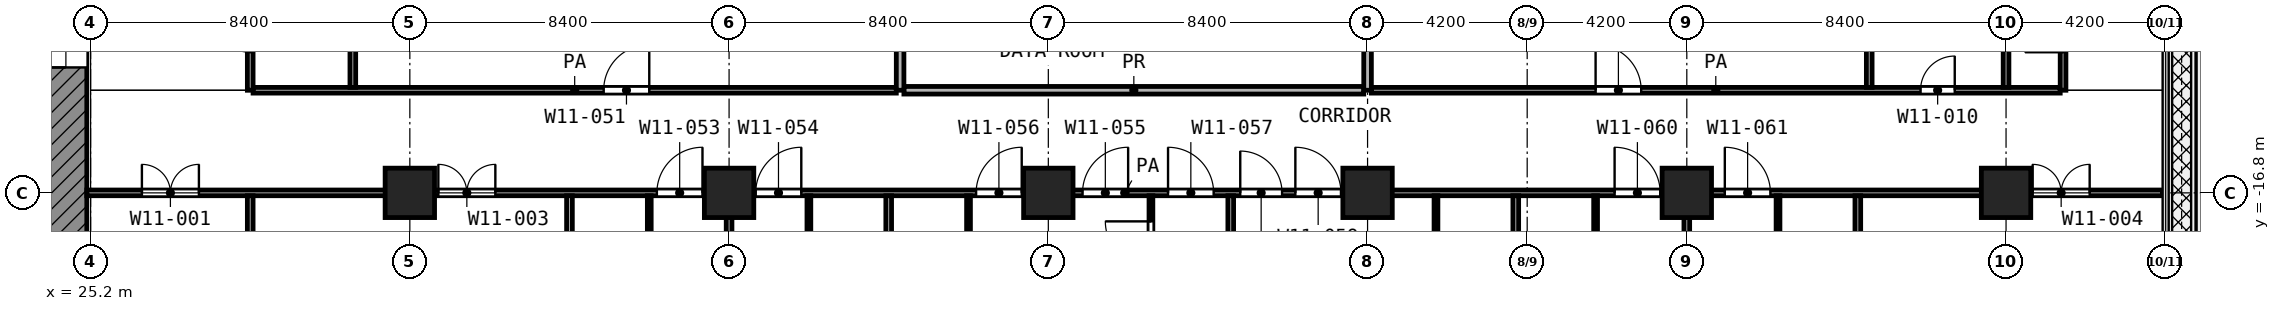
"""IFC4 building model, lengths in metres.
Left out: names, types, materials, properties, quantities, classifications, styles, units other than length and angle.
Written with IfcOpenShell. Run it as: python <this file> out.ifc"""

import sys

from ifc_helpers import new_model, si_unit, direction, frame, frame_2d, origin, origin_2d, place, context, subcontext, project, spatial, rectangle, extrude, element, fill, save


model = new_model("IFC4")
c1 = context("Model", 3, precision=1e-05, world=origin(), true_north=direction((0.0, 1.0)))
c2 = subcontext(c1, "Body", "Model", "MODEL_VIEW")
j1 = project(units=[si_unit("LENGTHUNIT", "METRE"), si_unit("PLANEANGLEUNIT", "RADIAN")], contexts=[c1])
p1 = place(None, origin())
s1 = spatial("IfcSite", under=j1, at=p1, CompositionType="ELEMENT")
p2 = place(p1, origin())
s2 = spatial("IfcBuilding", under=s1, at=p2, CompositionType="ELEMENT")
p3 = place(p2, frame((0.0, 0.0, 72.8)))
s3 = spatial("IfcBuildingStorey", under=s2, at=p3, CompositionType="ELEMENT", Elevation=72.8)
for number, where, z_axis, x_axis in (
    (1, (33.6, -16.8, 0.0), (0.0, 0.0, 1.0), (1.0, 0.0, 0.0)),
    (2, (42.0, -16.8, 0.0), (0.0, 0.0, 1.0), (1.0, 0.0, 0.0)),
    (3, (50.4, -16.8, 0.0), (0.0, 0.0, 1.0), (1.0, 0.0, 0.0)),
    (4, (58.8, -16.8, 0.0), (0.0, 0.0, 1.0), (1.0, 0.0, 0.0)),
    (5, (67.2, -16.8, 0.0), (0.0, 0.0, 1.0), (1.0, 0.0, 0.0)),
    (6, (75.6, -16.8, 0.0), (0.0, 0.0, 1.0), (1.0, 0.0, 0.0)),
):
    element("IfcColumn", number, at=place(p3, frame(where, z_axis=z_axis, x_axis=x_axis)), inside=s3, PredefinedType="COLUMN", context=c2, shape_type="SweptSolid", body=[
        extrude(rectangle(XDim=1.3, YDim=1.3, at=origin_2d()), origin(), (0.0, 0.0, 1.0), 4.2),
    ])
p4 = place(p3, frame((24.55, -24.0, 0.0), z_axis=(0.0, 0.0, 1.0), x_axis=(0.0, 1.0, 0.0)))
e7 = element("IfcWall", 7, at=p4, inside=s3, PredefinedType="SHEAR", context=c2, shape_type="SweptSolid", body=[
    extrude(rectangle(XDim=18.6, YDim=1.1, at=frame_2d((9.3, 0.0))), origin(), (0.0, 0.0, 1.0), 3.9),
])
p5 = place(p4, frame((10.5, 0.0, 0.0)))
e8 = element("IfcOpeningElement", 8, at=p5, cuts=e7, PredefinedType="OPENING", context=c2, shape_type="SweptSolid", body=[
    extrude(rectangle(XDim=1.8, YDim=2.1, at=frame_2d((0.9, 1.05))), frame((0.0, 0.56, 0.0), z_axis=(0.0, -1.0, 0.0), x_axis=(1.0, 0.0, 0.0)), (0.0, 0.0, 1.0), 1.12),
])
p6 = place(p3, frame((39.9, -20.1, 0.0), z_axis=(0.0, 0.0, 1.0), x_axis=(0.0, 1.0, 0.0)))
e9 = element("IfcWall", 9, at=p6, inside=s3, PredefinedType="PARTITIONING", context=c2, shape_type="SweptSolid", body=[
    extrude(rectangle(XDim=3.225, YDim=0.1, at=frame_2d((1.613, 0.0))), origin(), (0.0, 0.0, 1.0), 3.9),
])
for number, where, z_axis, x_axis in (
    (10, (44.1, -19.5, 0.0), (0.0, 0.0, 1.0), (0.0, 1.0, 0.0)),
    (11, (48.3, -19.5, 0.0), (0.0, 0.0, 1.0), (0.0, 1.0, 0.0)),
):
    element("IfcWall", number, at=place(p3, frame(where, z_axis=z_axis, x_axis=x_axis)), inside=s3, PredefinedType="PARTITIONING", context=c2, shape_type="SweptSolid", body=[
        extrude(rectangle(XDim=2.625, YDim=0.1, at=frame_2d((1.312, 0.0))), origin(), (0.0, 0.0, 1.0), 3.9),
    ])
p7 = place(p3, frame((53.1, -19.5, 0.0), z_axis=(0.0, 0.0, 1.0), x_axis=(0.0, 1.0, 0.0)))
e12 = element("IfcWall", 12, at=p7, inside=s3, PredefinedType="PARTITIONING", context=c2, shape_type="SweptSolid", body=[
    extrude(rectangle(XDim=2.625, YDim=0.1, at=frame_2d((1.312, 0.0))), origin(), (0.0, 0.0, 1.0), 3.9),
])
p8 = place(p7, frame((0.75, 0.0, 0.0)))
e13 = element("IfcOpeningElement", 13, at=p8, cuts=e12, PredefinedType="OPENING", context=c2, shape_type="SweptSolid", body=[
    extrude(rectangle(XDim=1.2, YDim=2.1, at=frame_2d((0.6, 1.05))), frame((0.0, 0.06, 0.0), z_axis=(0.0, -1.0, 0.0), x_axis=(1.0, 0.0, 0.0)), (0.0, 0.0, 1.0), 0.12),
])
p9 = place(p3, frame((60.6, -19.499, 0.0), z_axis=(0.0, 0.0, 1.0), x_axis=(0.0, 1.0, 0.0)))
e14 = element("IfcWall", 14, at=p9, inside=s3, PredefinedType="PARTITIONING", context=c2, shape_type="SweptSolid", body=[
    extrude(rectangle(XDim=2.624, YDim=0.1, at=frame_2d((1.312, 0.0))), origin(), (0.0, 0.0, 1.0), 3.9),
])
p10 = place(p3, frame((64.8, -20.1, 0.0), z_axis=(0.0, 0.0, 1.0), x_axis=(0.0, 1.0, 0.0)))
e15 = element("IfcWall", 15, at=p10, inside=s3, PredefinedType="PARTITIONING", context=c2, shape_type="SweptSolid", body=[
    extrude(rectangle(XDim=3.225, YDim=0.1, at=frame_2d((1.613, 0.0))), origin(), (0.0, 0.0, 1.0), 3.9),
])
p11 = place(p3, frame((69.6, -19.5, 0.0), z_axis=(0.0, 0.0, 1.0), x_axis=(0.0, 1.0, 0.0)))
e16 = element("IfcWall", 16, at=p11, inside=s3, PredefinedType="PARTITIONING", context=c2, shape_type="SweptSolid", body=[
    extrude(rectangle(XDim=2.625, YDim=0.1, at=frame_2d((1.312, 0.0))), origin(), (0.0, 0.0, 1.0), 3.9),
])
p12 = place(p3, frame((25.1, -16.8, 0.0), z_axis=(0.0, 0.0, 1.0), x_axis=(1.0, 0.0, 0.0)))
e17 = element("IfcWall", 17, at=p12, inside=s3, PredefinedType="PARTITIONING", context=c2, shape_type="SweptSolid", body=[
    extrude(rectangle(XDim=54.62, YDim=0.15, at=frame_2d((27.31, 0.0))), origin(), (0.0, 0.0, 1.0), 3.9),
])
p13 = place(p12, frame((1.45, 0.0, 0.0)))
e18 = element("IfcOpeningElement", 18, at=p13, cuts=e17, PredefinedType="OPENING", context=c2, shape_type="SweptSolid", body=[
    extrude(rectangle(XDim=1.5, YDim=2.1, at=frame_2d((0.75, 1.05))), frame((0.0, 0.085, 0.0), z_axis=(0.0, -1.0, 0.0), x_axis=(1.0, 0.0, 0.0)), (0.0, 0.0, 1.0), 0.17),
])
p14 = place(p12, frame((9.25, 0.0, 0.0)))
e19 = element("IfcOpeningElement", 19, at=p14, cuts=e17, PredefinedType="OPENING", context=c2, shape_type="SweptSolid", body=[
    extrude(rectangle(XDim=1.5, YDim=2.1, at=frame_2d((0.75, 1.05))), frame((0.0, 0.085, 0.0), z_axis=(0.0, -1.0, 0.0), x_axis=(1.0, 0.0, 0.0)), (0.0, 0.0, 1.0), 0.17),
])
p15 = place(p12, frame((15.0, 0.0, 0.0)))
e20 = element("IfcOpeningElement", 20, at=p15, cuts=e17, PredefinedType="OPENING", context=c2, shape_type="SweptSolid", body=[
    extrude(rectangle(XDim=1.2, YDim=2.1, at=frame_2d((0.6, 1.05))), frame((0.0, 0.085, 0.0), z_axis=(0.0, -1.0, 0.0), x_axis=(1.0, 0.0, 0.0)), (0.0, 0.0, 1.0), 0.17),
])
p16 = place(p12, frame((17.6, 0.0, 0.0)))
e21 = element("IfcOpeningElement", 21, at=p16, cuts=e17, PredefinedType="OPENING", context=c2, shape_type="SweptSolid", body=[
    extrude(rectangle(XDim=1.2, YDim=2.1, at=frame_2d((0.6, 1.05))), frame((0.0, 0.085, 0.0), z_axis=(0.0, -1.0, 0.0), x_axis=(1.0, 0.0, 0.0)), (0.0, 0.0, 1.0), 0.17),
])
p17 = place(p12, frame((26.2, 0.0, 0.0)))
e22 = element("IfcOpeningElement", 22, at=p17, cuts=e17, PredefinedType="OPENING", context=c2, shape_type="SweptSolid", body=[
    extrude(rectangle(XDim=1.2, YDim=2.1, at=frame_2d((0.6, 1.05))), frame((0.0, 0.085, 0.0), z_axis=(0.0, -1.0, 0.0), x_axis=(1.0, 0.0, 0.0)), (0.0, 0.0, 1.0), 0.17),
])
p18 = place(p12, frame((23.4, 0.0, 0.0)))
e23 = element("IfcOpeningElement", 23, at=p18, cuts=e17, PredefinedType="OPENING", context=c2, shape_type="SweptSolid", body=[
    extrude(rectangle(XDim=1.2, YDim=2.1, at=frame_2d((0.6, 1.05))), frame((0.0, 0.085, 0.0), z_axis=(0.0, -1.0, 0.0), x_axis=(1.0, 0.0, 0.0)), (0.0, 0.0, 1.0), 0.17),
])
p19 = place(p12, frame((28.45, 0.0, 0.0)))
e24 = element("IfcOpeningElement", 24, at=p19, cuts=e17, PredefinedType="OPENING", context=c2, shape_type="SweptSolid", body=[
    extrude(rectangle(XDim=1.2, YDim=2.1, at=frame_2d((0.6, 1.05))), frame((0.0, 0.085, 0.0), z_axis=(0.0, -1.0, 0.0), x_axis=(1.0, 0.0, 0.0)), (0.0, 0.0, 1.0), 0.17),
])
p20 = place(p12, frame((31.8, 0.0, 0.0)))
e25 = element("IfcOpeningElement", 25, at=p20, cuts=e17, PredefinedType="OPENING", context=c2, shape_type="SweptSolid", body=[
    extrude(rectangle(XDim=1.2, YDim=2.1, at=frame_2d((0.6, 1.05))), frame((0.0, 0.085, 0.0), z_axis=(0.0, -1.0, 0.0), x_axis=(1.0, 0.0, 0.0)), (0.0, 0.0, 1.0), 0.17),
])
p21 = place(p12, frame((30.35, 0.0, 0.0)))
e26 = element("IfcOpeningElement", 26, at=p21, cuts=e17, PredefinedType="OPENING", context=c2, shape_type="SweptSolid", body=[
    extrude(rectangle(XDim=1.1, YDim=2.1, at=frame_2d((0.55, 1.05))), frame((0.0, 0.085, 0.0), z_axis=(0.0, -1.0, 0.0), x_axis=(1.0, 0.0, 0.0)), (0.0, 0.0, 1.0), 0.17),
])
p22 = place(p12, frame((40.2, 0.0, 0.0)))
e27 = element("IfcOpeningElement", 27, at=p22, cuts=e17, PredefinedType="OPENING", context=c2, shape_type="SweptSolid", body=[
    extrude(rectangle(XDim=1.2, YDim=2.1, at=frame_2d((0.6, 1.05))), frame((0.0, 0.085, 0.0), z_axis=(0.0, -1.0, 0.0), x_axis=(1.0, 0.0, 0.0)), (0.0, 0.0, 1.0), 0.17),
])
p23 = place(p12, frame((43.1, 0.0, 0.0)))
e28 = element("IfcOpeningElement", 28, at=p23, cuts=e17, PredefinedType="OPENING", context=c2, shape_type="SweptSolid", body=[
    extrude(rectangle(XDim=1.2, YDim=2.1, at=frame_2d((0.6, 1.05))), frame((0.0, 0.085, 0.0), z_axis=(0.0, -1.0, 0.0), x_axis=(1.0, 0.0, 0.0)), (0.0, 0.0, 1.0), 0.17),
])
p24 = place(p12, frame((51.2, 0.0, 0.0)))
e29 = element("IfcOpeningElement", 29, at=p24, cuts=e17, PredefinedType="OPENING", context=c2, shape_type="SweptSolid", body=[
    extrude(rectangle(XDim=1.5, YDim=2.1, at=frame_2d((0.75, 1.05))), frame((0.0, 0.085, 0.0), z_axis=(0.0, -1.0, 0.0), x_axis=(1.0, 0.0, 0.0)), (0.0, 0.0, 1.0), 0.17),
])
p25 = place(p3, frame((29.475, -14.1, 0.0), z_axis=(0.0, 0.0, 1.0), x_axis=(1.0, 0.0, 0.0)))
e30 = element("IfcWall", 30, at=p25, inside=s3, PredefinedType="PARTITIONING", context=c2, shape_type="SweptSolid", body=[
    extrude(rectangle(XDim=16.925, YDim=0.15, at=frame_2d((8.462, 0.0))), origin(), (0.0, 0.0, 1.0), 3.9),
])
p26 = place(p25, frame((9.225, 0.0, 0.0)))
e31 = element("IfcOpeningElement", 31, at=p26, cuts=e30, PredefinedType="OPENING", context=c2, shape_type="SweptSolid", body=[
    extrude(rectangle(XDim=1.2, YDim=2.1, at=frame_2d((0.6, 1.05))), frame((0.0, 0.085, 0.0), z_axis=(0.0, -1.0, 0.0), x_axis=(1.0, 0.0, 0.0)), (0.0, 0.0, 1.0), 0.17),
])
p27 = place(p3, frame((58.9, -14.1, 0.0), z_axis=(0.0, 0.0, 1.0), x_axis=(1.0, 0.0, 0.0)))
e32 = element("IfcWall", 32, at=p27, inside=s3, PredefinedType="PARTITIONING", context=c2, shape_type="SweptSolid", body=[
    extrude(rectangle(XDim=18.125, YDim=0.15, at=frame_2d((9.062, 0.0))), origin(), (0.0, 0.0, 1.0), 3.9),
])
p28 = place(p27, frame((5.9, 0.0, 0.0)))
e33 = element("IfcOpeningElement", 33, at=p28, cuts=e32, PredefinedType="OPENING", context=c2, shape_type="SweptSolid", body=[
    extrude(rectangle(XDim=1.2, YDim=2.1, at=frame_2d((0.6, 1.05))), frame((0.0, 0.085, 0.0), z_axis=(0.0, -1.0, 0.0), x_axis=(1.0, 0.0, 0.0)), (0.0, 0.0, 1.0), 0.17),
])
p29 = place(p27, frame((14.45, 0.0, 0.0)))
e34 = element("IfcOpeningElement", 34, at=p29, cuts=e32, PredefinedType="OPENING", context=c2, shape_type="SweptSolid", body=[
    extrude(rectangle(XDim=0.9, YDim=2.1, at=frame_2d((0.45, 1.05))), frame((0.0, 0.085, 0.0), z_axis=(0.0, -1.0, 0.0), x_axis=(1.0, 0.0, 0.0)), (0.0, 0.0, 1.0), 0.17),
])
p30 = place(p3, frame((29.4, -25.2, 0.0), z_axis=(0.0, 0.0, 1.0), x_axis=(0.0, 1.0, 0.0)))
e35 = element("IfcWall", 35, at=p30, inside=s3, PredefinedType="PARTITIONING", context=c2, shape_type="SweptSolid", body=[
    extrude(rectangle(XDim=8.325, YDim=0.15, at=frame_2d((4.163, 0.0))), origin(), (0.0, 0.0, 1.0), 3.9),
])
p31 = place(p3, frame((29.4, -14.1, 0.0), z_axis=(0.0, 0.0, 1.0), x_axis=(0.0, 1.0, 0.0)))
e36 = element("IfcWall", 36, at=p31, inside=s3, PredefinedType="PARTITIONING", context=c2, shape_type="SweptSolid", body=[
    extrude(rectangle(XDim=3.0, YDim=0.15, at=frame_2d((1.5, 0.0))), origin(), (0.0, 0.0, 1.0), 3.9),
])
p32 = place(p31, frame((1.0, 0.0, 0.0)))
e37 = element("IfcOpeningElement", 37, at=p32, cuts=e36, PredefinedType="OPENING", context=c2, shape_type="SweptSolid", body=[
    extrude(rectangle(XDim=1.0, YDim=2.1, at=frame_2d((0.5, 1.05))), frame((0.0, 0.085, 0.0), z_axis=(0.0, -1.0, 0.0), x_axis=(1.0, 0.0, 0.0)), (0.0, 0.0, 1.0), 0.17),
])
p33 = place(p3, frame((32.1, -14.025, 0.0), z_axis=(0.0, 0.0, 1.0), x_axis=(0.0, 1.0, 0.0)))
e38 = element("IfcWall", 38, at=p33, inside=s3, PredefinedType="PARTITIONING", context=c2, shape_type="SweptSolid", body=[
    extrude(rectangle(XDim=2.85, YDim=0.15, at=frame_2d((1.425, 0.0))), origin(), (0.0, 0.0, 1.0), 3.9),
])
for number, where, z_axis, x_axis in (
    (39, (37.8, -25.12, 0.0), (0.0, 0.0, 1.0), (0.0, 1.0, 0.0)),
    (40, (42.0, -25.12, 0.0), (0.0, 0.0, 1.0), (0.0, 1.0, 0.0)),
    (41, (46.2, -25.12, 0.0), (0.0, 0.0, 1.0), (0.0, 1.0, 0.0)),
    (42, (55.2, -25.12, 0.0), (0.0, 0.0, 1.0), (0.0, 1.0, 0.0)),
    (43, (62.7, -25.12, 0.0), (0.0, 0.0, 1.0), (0.0, 1.0, 0.0)),
    (44, (67.2, -25.12, 0.0), (0.0, 0.0, 1.0), (0.0, 1.0, 0.0)),
    (45, (71.7, -25.12, 0.0), (0.0, 0.0, 1.0), (0.0, 1.0, 0.0)),
):
    element("IfcWall", number, at=place(p3, frame(where, z_axis=z_axis, x_axis=x_axis)), inside=s3, PredefinedType="PARTITIONING", context=c2, shape_type="SweptSolid", body=[
        extrude(rectangle(XDim=8.245, YDim=0.15, at=frame_2d((4.123, 0.0))), origin(), (0.0, 0.0, 1.0), 3.9),
    ])
for number, where, z_axis, x_axis in (
    (46, (72.0, -14.025, 0.0), (0.0, 0.0, 1.0), (0.0, 1.0, 0.0)),
    (47, (75.6, -14.025, 0.0), (0.0, 0.0, 1.0), (0.0, 1.0, 0.0)),
):
    element("IfcWall", number, at=place(p3, frame(where, z_axis=z_axis, x_axis=x_axis)), inside=s3, PredefinedType="PARTITIONING", context=c2, shape_type="SweptSolid", body=[
        extrude(rectangle(XDim=2.85, YDim=0.15, at=frame_2d((1.425, 0.0))), origin(), (0.0, 0.0, 1.0), 3.9),
    ])
p34 = place(p3, frame((77.1, -14.1, 0.0), z_axis=(0.0, 0.0, 1.0), x_axis=(0.0, 1.0, 0.0)))
e48 = element("IfcWall", 48, at=p34, inside=s3, PredefinedType="PARTITIONING", context=c2, shape_type="SweptSolid", body=[
    extrude(rectangle(XDim=3.0, YDim=0.15, at=frame_2d((1.5, 0.0))), origin(), (0.0, 0.0, 1.0), 3.9),
])
p35 = place(p34, frame((1.0, 0.0, 0.0)))
e49 = element("IfcOpeningElement", 49, at=p35, cuts=e48, PredefinedType="OPENING", context=c2, shape_type="SweptSolid", body=[
    extrude(rectangle(XDim=1.0, YDim=2.1, at=frame_2d((0.5, 1.05))), frame((0.0, 0.085, 0.0), z_axis=(0.0, -1.0, 0.0), x_axis=(1.0, 0.0, 0.0)), (0.0, 0.0, 1.0), 0.17),
])
p36 = place(p3, frame((46.6, -14.1, 0.0), z_axis=(0.0, 0.0, 1.0), x_axis=(1.0, 0.0, 0.0)))
e50 = element("IfcWall", 50, at=p36, inside=s3, PredefinedType="PARTITIONING", context=c2, shape_type="SweptSolid", body=[
    extrude(rectangle(XDim=12.1, YDim=0.2, at=frame_2d((6.05, 0.0))), origin(), (0.0, 0.0, 1.0), 3.9),
])
for number, where, z_axis, x_axis in (
    (51, (46.5, -14.1, 0.0), (0.0, 0.0, 1.0), (0.0, 1.0, 0.0)),
    (52, (58.8, -14.1, 0.0), (0.0, 0.0, 1.0), (0.0, 1.0, 0.0)),
):
    element("IfcWall", number, at=place(p3, frame(where, z_axis=z_axis, x_axis=x_axis)), inside=s3, PredefinedType="PARTITIONING", context=c2, shape_type="SweptSolid", body=[
        extrude(rectangle(XDim=3.0, YDim=0.2, at=frame_2d((1.5, 0.0))), origin(), (0.0, 0.0, 1.0), 3.9),
    ])
p37 = place(p5, origin())
e53 = element("IfcDoor", 53, at=p37, inside=s3, OperationType="DOUBLE_DOOR_SINGLE_SWING", PredefinedType="DOOR", context=c2, shape_type="SweptSolid", body=[
    extrude(rectangle(XDim=1.8, YDim=2.1, at=frame_2d((0.9, 1.05))), frame((0.0, 0.025, 0.0), z_axis=(0.0, -1.0, 0.0), x_axis=(1.0, 0.0, 0.0)), (0.0, 0.0, 1.0), 0.05),
])
fill(e8, e53)
p38 = place(p13, origin())
e54 = element("IfcDoor", 54, at=p38, inside=s3, OperationType="DOUBLE_DOOR_SINGLE_SWING", PredefinedType="DOOR", context=c2, shape_type="SweptSolid", body=[
    extrude(rectangle(XDim=1.5, YDim=2.1, at=frame_2d((0.75, 1.05))), frame((0.0, 0.025, 0.0), z_axis=(0.0, -1.0, 0.0), x_axis=(1.0, 0.0, 0.0)), (0.0, 0.0, 1.0), 0.05),
])
fill(e18, e54)
p39 = place(p26, origin())
e55 = element("IfcDoor", 55, at=p39, inside=s3, OperationType="SINGLE_SWING_RIGHT", PredefinedType="DOOR", context=c2, shape_type="SweptSolid", body=[
    extrude(rectangle(XDim=1.2, YDim=2.1, at=frame_2d((0.6, 1.05))), frame((0.0, 0.025, 0.0), z_axis=(0.0, -1.0, 0.0), x_axis=(1.0, 0.0, 0.0)), (0.0, 0.0, 1.0), 0.05),
])
fill(e31, e55)
p40 = place(p28, origin())
e56 = element("IfcDoor", 56, at=p40, inside=s3, OperationType="SINGLE_SWING_LEFT", PredefinedType="DOOR", context=c2, shape_type="SweptSolid", body=[
    extrude(rectangle(XDim=1.2, YDim=2.1, at=frame_2d((0.6, 1.05))), frame((0.0, 0.025, 0.0), z_axis=(0.0, -1.0, 0.0), x_axis=(1.0, 0.0, 0.0)), (0.0, 0.0, 1.0), 0.05),
])
fill(e33, e56)
p41 = place(p29, origin())
e57 = element("IfcDoor", 57, at=p41, inside=s3, OperationType="SINGLE_SWING_RIGHT", PredefinedType="DOOR", context=c2, shape_type="SweptSolid", body=[
    extrude(rectangle(XDim=0.9, YDim=2.1, at=frame_2d((0.45, 1.05))), frame((0.0, 0.025, 0.0), z_axis=(0.0, -1.0, 0.0), x_axis=(1.0, 0.0, 0.0)), (0.0, 0.0, 1.0), 0.05),
])
fill(e34, e57)
p42 = place(p14, origin())
e58 = element("IfcDoor", 58, at=p42, inside=s3, OperationType="DOUBLE_DOOR_SINGLE_SWING", PredefinedType="DOOR", context=c2, shape_type="SweptSolid", body=[
    extrude(rectangle(XDim=1.5, YDim=2.1, at=frame_2d((0.75, 1.05))), frame((0.0, 0.025, 0.0), z_axis=(0.0, -1.0, 0.0), x_axis=(1.0, 0.0, 0.0)), (0.0, 0.0, 1.0), 0.05),
])
fill(e19, e58)
p43 = place(p15, origin())
e59 = element("IfcDoor", 59, at=p43, inside=s3, OperationType="SINGLE_SWING_RIGHT", PredefinedType="DOOR", context=c2, shape_type="SweptSolid", body=[
    extrude(rectangle(XDim=1.2, YDim=2.1, at=frame_2d((0.6, 1.05))), frame((0.0, 0.025, 0.0), z_axis=(0.0, -1.0, 0.0), x_axis=(1.0, 0.0, 0.0)), (0.0, 0.0, 1.0), 0.05),
])
fill(e20, e59)
p44 = place(p16, origin())
e60 = element("IfcDoor", 60, at=p44, inside=s3, OperationType="SINGLE_SWING_RIGHT", PredefinedType="DOOR", context=c2, shape_type="SweptSolid", body=[
    extrude(rectangle(XDim=1.2, YDim=2.1, at=frame_2d((0.6, 1.05))), frame((0.0, 0.025, 0.0), z_axis=(0.0, -1.0, 0.0), x_axis=(1.0, 0.0, 0.0)), (0.0, 0.0, 1.0), 0.05),
])
fill(e21, e60)
p45 = place(p17, origin())
e61 = element("IfcDoor", 61, at=p45, inside=s3, OperationType="SINGLE_SWING_RIGHT", PredefinedType="DOOR", context=c2, shape_type="SweptSolid", body=[
    extrude(rectangle(XDim=1.2, YDim=2.1, at=frame_2d((0.6, 1.05))), frame((0.0, 0.025, 0.0), z_axis=(0.0, -1.0, 0.0), x_axis=(1.0, 0.0, 0.0)), (0.0, 0.0, 1.0), 0.05),
])
fill(e22, e61)
p46 = place(p18, origin())
e62 = element("IfcDoor", 62, at=p46, inside=s3, OperationType="SINGLE_SWING_RIGHT", PredefinedType="DOOR", context=c2, shape_type="SweptSolid", body=[
    extrude(rectangle(XDim=1.2, YDim=2.1, at=frame_2d((0.6, 1.05))), frame((0.0, 0.025, 0.0), z_axis=(0.0, -1.0, 0.0), x_axis=(1.0, 0.0, 0.0)), (0.0, 0.0, 1.0), 0.05),
])
fill(e23, e62)
p47 = place(p19, origin())
e63 = element("IfcDoor", 63, at=p47, inside=s3, OperationType="SINGLE_SWING_LEFT", PredefinedType="DOOR", context=c2, shape_type="SweptSolid", body=[
    extrude(rectangle(XDim=1.2, YDim=2.1, at=frame_2d((0.6, 1.05))), frame((0.0, 0.025, 0.0), z_axis=(0.0, -1.0, 0.0), x_axis=(1.0, 0.0, 0.0)), (0.0, 0.0, 1.0), 0.05),
])
fill(e24, e63)
p48 = place(p8, origin())
e64 = element("IfcDoor", 64, at=p48, inside=s3, OperationType="SINGLE_SWING_RIGHT", PredefinedType="DOOR", context=c2, shape_type="SweptSolid", body=[
    extrude(rectangle(XDim=1.2, YDim=2.1, at=frame_2d((0.6, 1.05))), frame((0.0, 0.025, 0.0), z_axis=(0.0, -1.0, 0.0), x_axis=(1.0, 0.0, 0.0)), (0.0, 0.0, 1.0), 0.05),
])
fill(e13, e64)
p49 = place(p20, origin())
e65 = element("IfcDoor", 65, at=p49, inside=s3, OperationType="SINGLE_SWING_LEFT", PredefinedType="DOOR", context=c2, shape_type="SweptSolid", body=[
    extrude(rectangle(XDim=1.2, YDim=2.1, at=frame_2d((0.6, 1.05))), frame((0.0, 0.025, 0.0), z_axis=(0.0, -1.0, 0.0), x_axis=(1.0, 0.0, 0.0)), (0.0, 0.0, 1.0), 0.05),
])
fill(e25, e65)
p50 = place(p21, origin())
e66 = element("IfcDoor", 66, at=p50, inside=s3, OperationType="SINGLE_SWING_LEFT", PredefinedType="DOOR", context=c2, shape_type="SweptSolid", body=[
    extrude(rectangle(XDim=1.1, YDim=2.1, at=frame_2d((0.55, 1.05))), frame((0.0, 0.025, 0.0), z_axis=(0.0, -1.0, 0.0), x_axis=(1.0, 0.0, 0.0)), (0.0, 0.0, 1.0), 0.05),
])
fill(e26, e66)
p51 = place(p22, origin())
e67 = element("IfcDoor", 67, at=p51, inside=s3, OperationType="SINGLE_SWING_LEFT", PredefinedType="DOOR", context=c2, shape_type="SweptSolid", body=[
    extrude(rectangle(XDim=1.2, YDim=2.1, at=frame_2d((0.6, 1.05))), frame((0.0, 0.025, 0.0), z_axis=(0.0, -1.0, 0.0), x_axis=(1.0, 0.0, 0.0)), (0.0, 0.0, 1.0), 0.05),
])
fill(e27, e67)
p52 = place(p23, origin())
e68 = element("IfcDoor", 68, at=p52, inside=s3, OperationType="SINGLE_SWING_LEFT", PredefinedType="DOOR", context=c2, shape_type="SweptSolid", body=[
    extrude(rectangle(XDim=1.2, YDim=2.1, at=frame_2d((0.6, 1.05))), frame((0.0, 0.025, 0.0), z_axis=(0.0, -1.0, 0.0), x_axis=(1.0, 0.0, 0.0)), (0.0, 0.0, 1.0), 0.05),
])
fill(e28, e68)
p53 = place(p24, origin())
e69 = element("IfcDoor", 69, at=p53, inside=s3, OperationType="DOUBLE_DOOR_SINGLE_SWING", PredefinedType="DOOR", context=c2, shape_type="SweptSolid", body=[
    extrude(rectangle(XDim=1.5, YDim=2.1, at=frame_2d((0.75, 1.05))), frame((0.0, 0.025, 0.0), z_axis=(0.0, -1.0, 0.0), x_axis=(1.0, 0.0, 0.0)), (0.0, 0.0, 1.0), 0.05),
])
fill(e29, e69)
save(model, sys.argv[1])
